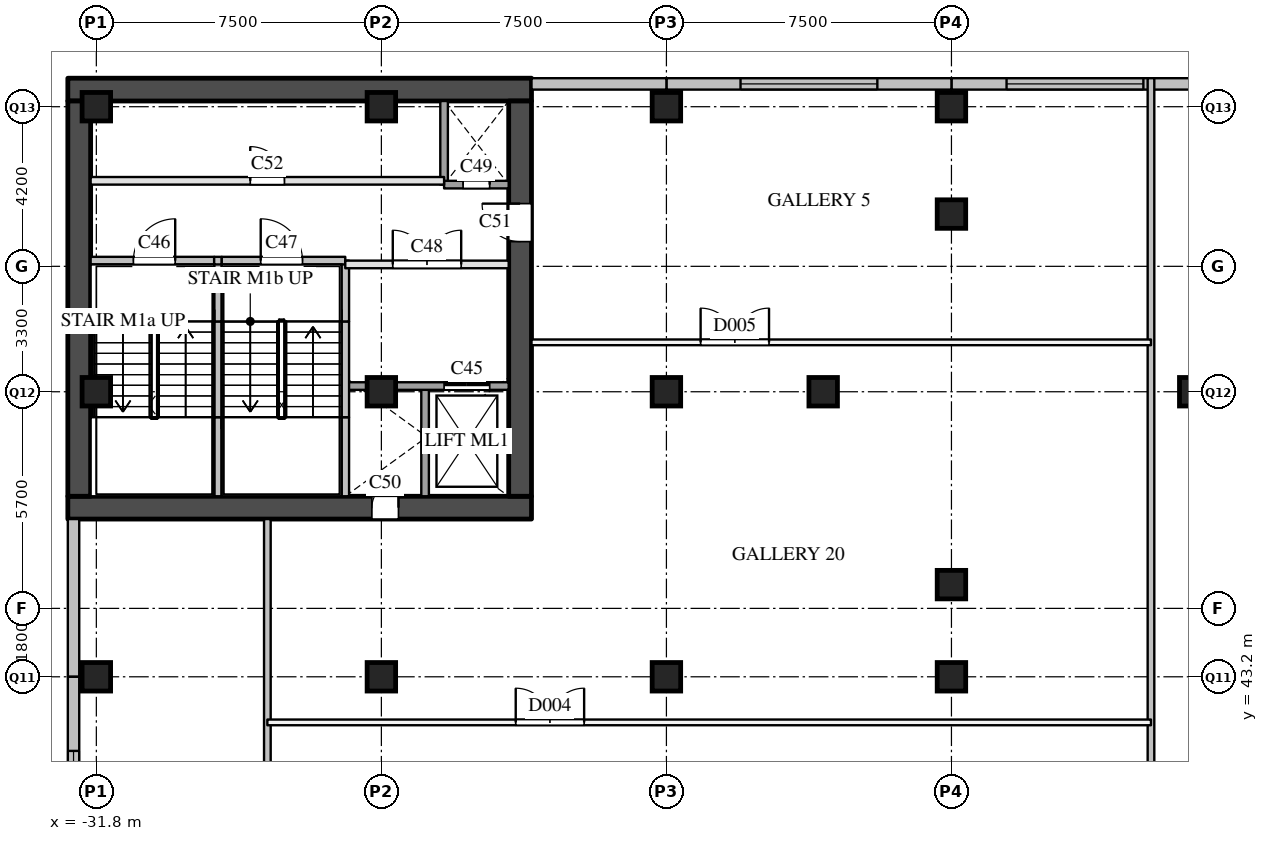
"""IFC4 building model, lengths in metres.
Left out: names, types, materials, properties, quantities, classifications, styles, units other than length and angle.
Written with IfcOpenShell. Run it as: python <this file> out.ifc"""

import sys

from ifc_helpers import new_model, si_unit, direction, frame, frame_2d, origin, origin_2d, place, context, subcontext, project, spatial, rectangle, extrude, element, fill, save


model = new_model("IFC4")
c1 = context("Model", 3, precision=1e-05, world=origin(), true_north=direction((0.0, 1.0)))
c2 = subcontext(c1, "Body", "Model", "MODEL_VIEW")
j1 = project(units=[si_unit("LENGTHUNIT", "METRE"), si_unit("PLANEANGLEUNIT", "RADIAN")], contexts=[c1])
p1 = place(None, origin())
s1 = spatial("IfcSite", under=j1, at=p1, CompositionType="ELEMENT")
p2 = place(p1, origin())
s2 = spatial("IfcBuilding", under=s1, at=p2, CompositionType="ELEMENT")
p3 = place(p2, frame((0.0, 0.0, 14.0)))
s3 = spatial("IfcBuildingStorey", under=s2, at=p3, CompositionType="ELEMENT", Elevation=14.0)
for number, where, z_axis, x_axis in (
    (1, (-31.8, 43.2, 0.0), (0.0, 0.0, 1.0), (1.0, 0.0, 0.0)),
    (2, (-31.8, 50.7, 0.0), (0.0, 0.0, 1.0), (1.0, 0.0, 0.0)),
    (3, (-31.8, 58.2, 0.0), (0.0, 0.0, 1.0), (1.0, 0.0, 0.0)),
    (4, (-24.3, 43.2, 0.0), (0.0, 0.0, 1.0), (1.0, 0.0, 0.0)),
    (5, (-24.3, 50.7, 0.0), (0.0, 0.0, 1.0), (1.0, 0.0, 0.0)),
    (6, (-24.3, 58.2, 0.0), (0.0, 0.0, 1.0), (1.0, 0.0, 0.0)),
    (7, (-16.8, 43.2, 0.0), (0.0, 0.0, 1.0), (1.0, 0.0, 0.0)),
    (8, (-16.8, 50.7, 0.0), (0.0, 0.0, 1.0), (1.0, 0.0, 0.0)),
    (9, (-16.8, 58.2, 0.0), (0.0, 0.0, 1.0), (1.0, 0.0, 0.0)),
    (10, (-9.3, 43.2, 0.0), (0.0, 0.0, 1.0), (1.0, 0.0, 0.0)),
    (11, (-9.3, 58.2, 0.0), (0.0, 0.0, 1.0), (1.0, 0.0, 0.0)),
    (12, (-12.675, 50.7, 0.0), (0.0, 0.0, 1.0), (1.0, 0.0, 0.0)),
    (13, (-9.3, 45.625, 0.0), (0.0, 0.0, 1.0), (1.0, 0.0, 0.0)),
    (14, (-9.3, 55.375, 0.0), (0.0, 0.0, 1.0), (1.0, 0.0, 0.0)),
    (15, (-2.925, 50.7, 0.0), (0.0, 0.0, 1.0), (1.0, 0.0, 0.0)),
):
    element("IfcColumn", number, at=place(p3, frame(where, z_axis=z_axis, x_axis=x_axis)), inside=s3, PredefinedType="COLUMN", context=c2, shape_type="SweptSolid", body=[
        extrude(rectangle(XDim=0.75, YDim=0.75, at=origin_2d()), origin(), (0.0, 0.0, 1.0), 7.0),
    ])
p4 = place(p3, frame((-1.8, 58.8, 0.0), z_axis=(0.0, 0.0, 1.0), x_axis=(-1.0, 0.0, 0.0)))
e16 = element("IfcWall", 16, at=p4, inside=s3, PredefinedType="SOLIDWALL", context=c2, shape_type="SweptSolid", body=[
    extrude(rectangle(XDim=7.5, YDim=0.3, at=frame_2d((3.75, 0.0))), origin(), (0.0, 0.0, 1.0), 6.59),
])
p5 = place(p4, frame((2.45, 0.0, 0.9)))
e17 = element("IfcOpeningElement", 17, at=p5, cuts=e16, PredefinedType="OPENING", context=c2, shape_type="SweptSolid", body=[
    extrude(rectangle(XDim=3.6, YDim=3.0, at=frame_2d((1.8, 1.5))), frame((0.0, 0.16, 0.0), z_axis=(0.0, -1.0, 0.0), x_axis=(1.0, 0.0, 0.0)), (0.0, 0.0, 1.0), 0.32),
])
p6 = place(p3, frame((-9.3, 58.8, 0.0), z_axis=(0.0, 0.0, 1.0), x_axis=(-1.0, 0.0, 0.0)))
e18 = element("IfcWall", 18, at=p6, inside=s3, PredefinedType="SOLIDWALL", context=c2, shape_type="SweptSolid", body=[
    extrude(rectangle(XDim=7.5, YDim=0.3, at=frame_2d((3.75, 0.0))), origin(), (0.0, 0.0, 1.0), 6.59),
])
p7 = place(p6, frame((1.95, 0.0, 0.9)))
e19 = element("IfcOpeningElement", 19, at=p7, cuts=e18, PredefinedType="OPENING", context=c2, shape_type="SweptSolid", body=[
    extrude(rectangle(XDim=3.6, YDim=3.0, at=frame_2d((1.8, 1.5))), frame((0.0, 0.16, 0.0), z_axis=(0.0, -1.0, 0.0), x_axis=(1.0, 0.0, 0.0)), (0.0, 0.0, 1.0), 0.32),
])
p8 = place(p3, frame((-16.8, 58.8, 0.0), z_axis=(0.0, 0.0, 1.0), x_axis=(-1.0, 0.0, 0.0)))
e20 = element("IfcWall", 20, at=p8, inside=s3, PredefinedType="SOLIDWALL", context=c2, shape_type="SweptSolid", body=[
    extrude(rectangle(XDim=3.55, YDim=0.3, at=frame_2d((1.775, 0.0))), origin(), (0.0, 0.0, 1.0), 6.59),
])
p9 = place(p3, frame((-32.4, 47.35, 0.0), z_axis=(0.0, 0.0, 1.0), x_axis=(0.0, -1.0, 0.0)))
e21 = element("IfcWall", 21, at=p9, inside=s3, PredefinedType="SOLIDWALL", context=c2, shape_type="SweptSolid", body=[
    extrude(rectangle(XDim=4.15, YDim=0.3, at=frame_2d((2.075, 0.0))), origin(), (0.0, 0.0, 1.0), 6.59),
])
p10 = place(p3, frame((-32.4, 43.2, 0.0), z_axis=(0.0, 0.0, 1.0), x_axis=(0.0, -1.0, 0.0)))
e22 = element("IfcWall", 22, at=p10, inside=s3, PredefinedType="SOLIDWALL", context=c2, shape_type="SweptSolid", body=[
    extrude(rectangle(XDim=7.5, YDim=0.3, at=frame_2d((3.75, 0.0))), origin(), (0.0, 0.0, 1.0), 6.59),
])
p11 = place(p10, frame((1.95, 0.0, 0.9)))
e23 = element("IfcOpeningElement", 23, at=p11, cuts=e22, PredefinedType="OPENING", context=c2, shape_type="SweptSolid", body=[
    extrude(rectangle(XDim=3.6, YDim=3.0, at=frame_2d((1.8, 1.5))), frame((0.0, 0.16, 0.0), z_axis=(0.0, -1.0, 0.0), x_axis=(1.0, 0.0, 0.0)), (0.0, 0.0, 1.0), 0.32),
])
p12 = place(p3, frame((-32.55, 47.65, 0.0), z_axis=(0.0, 0.0, 1.0), x_axis=(1.0, 0.0, 0.0)))
e24 = element("IfcWall", 24, at=p12, inside=s3, PredefinedType="SHEAR", context=c2, shape_type="SweptSolid", body=[
    extrude(rectangle(XDim=12.2, YDim=0.6, at=frame_2d((6.1, 0.0))), origin(), (0.0, 0.0, 1.0), 6.59),
])
p13 = place(p12, frame((8.0, 0.0, 0.0)))
e25 = element("IfcOpeningElement", 25, at=p13, cuts=e24, PredefinedType="OPENING", context=c2, shape_type="SweptSolid", body=[
    extrude(rectangle(XDim=0.7, YDim=2.1, at=frame_2d((0.35, 1.05))), frame((0.0, 0.31, 0.0), z_axis=(0.0, -1.0, 0.0), x_axis=(1.0, 0.0, 0.0)), (0.0, 0.0, 1.0), 0.62),
])
p14 = place(p3, frame((-32.55, 58.65, 0.0), z_axis=(0.0, 0.0, 1.0), x_axis=(1.0, 0.0, 0.0)))
e26 = element("IfcWall", 26, at=p14, inside=s3, PredefinedType="SHEAR", context=c2, shape_type="SweptSolid", body=[
    extrude(rectangle(XDim=12.2, YDim=0.6, at=frame_2d((6.1, 0.0))), origin(), (0.0, 0.0, 1.0), 6.59),
])
p15 = place(p3, frame((-32.25, 47.95, 0.0), z_axis=(0.0, 0.0, 1.0), x_axis=(0.0, 1.0, 0.0)))
e27 = element("IfcWall", 27, at=p15, inside=s3, PredefinedType="SHEAR", context=c2, shape_type="SweptSolid", body=[
    extrude(rectangle(XDim=10.4, YDim=0.6, at=frame_2d((5.2, 0.0))), origin(), (0.0, 0.0, 1.0), 6.59),
])
p16 = place(p3, frame((-20.65, 47.95, 0.0), z_axis=(0.0, 0.0, 1.0), x_axis=(0.0, 1.0, 0.0)))
e28 = element("IfcWall", 28, at=p16, inside=s3, PredefinedType="SHEAR", context=c2, shape_type="SweptSolid", body=[
    extrude(rectangle(XDim=10.4, YDim=0.6, at=frame_2d((5.2, 0.0))), origin(), (0.0, 0.0, 1.0), 6.59),
])
p17 = place(p16, frame((6.7, 0.0, 0.0)))
e29 = element("IfcOpeningElement", 29, at=p17, cuts=e28, PredefinedType="OPENING", context=c2, shape_type="SweptSolid", body=[
    extrude(rectangle(XDim=1.0, YDim=2.1, at=frame_2d((0.5, 1.05))), frame((0.0, 0.31, 0.0), z_axis=(0.0, -1.0, 0.0), x_axis=(1.0, 0.0, 0.0)), (0.0, 0.0, 1.0), 0.62),
])
p18 = place(p3, frame((-28.6, 47.95, 0.0), z_axis=(0.0, 0.0, 1.0), x_axis=(0.0, 1.0, 0.0)))
e30 = element("IfcWall", 30, at=p18, inside=s3, PredefinedType="SOLIDWALL", context=c2, shape_type="SweptSolid", body=[
    extrude(rectangle(XDim=2.08, YDim=0.2, at=frame_2d((1.04, 0.0))), origin(), (0.0, 0.0, 1.0), 6.59),
])
p19 = place(p3, frame((-28.6, 50.03, 0.0), z_axis=(0.0, 0.0, 1.0), x_axis=(0.0, 1.0, 0.0)))
e31 = element("IfcWall", 31, at=p19, inside=s3, PredefinedType="SOLIDWALL", context=c2, shape_type="SweptSolid", body=[
    extrude(rectangle(XDim=2.52, YDim=0.2, at=frame_2d((1.26, 0.0))), origin(), (0.0, 0.0, 1.0), 6.59),
])
p20 = place(p3, frame((-28.6, 52.55, 0.0), z_axis=(0.0, 0.0, 1.0), x_axis=(0.0, 1.0, 0.0)))
e32 = element("IfcWall", 32, at=p20, inside=s3, PredefinedType="SOLIDWALL", context=c2, shape_type="SweptSolid", body=[
    extrude(rectangle(XDim=1.6, YDim=0.2, at=frame_2d((0.8, 0.0))), origin(), (0.0, 0.0, 1.0), 6.59),
])
p21 = place(p3, frame((-25.25, 47.95, 0.0), z_axis=(0.0, 0.0, 1.0), x_axis=(0.0, 1.0, 0.0)))
e33 = element("IfcWall", 33, at=p21, inside=s3, PredefinedType="SOLIDWALL", context=c2, shape_type="SweptSolid", body=[
    extrude(rectangle(XDim=2.08, YDim=0.2, at=frame_2d((1.04, 0.0))), origin(), (0.0, 0.0, 1.0), 6.59),
])
p22 = place(p3, frame((-25.25, 50.03, 0.0), z_axis=(0.0, 0.0, 1.0), x_axis=(0.0, 1.0, 0.0)))
e34 = element("IfcWall", 34, at=p22, inside=s3, PredefinedType="SOLIDWALL", context=c2, shape_type="SweptSolid", body=[
    extrude(rectangle(XDim=2.52, YDim=0.2, at=frame_2d((1.26, 0.0))), origin(), (0.0, 0.0, 1.0), 6.59),
])
p23 = place(p3, frame((-25.25, 52.55, 0.0), z_axis=(0.0, 0.0, 1.0), x_axis=(0.0, 1.0, 0.0)))
e35 = element("IfcWall", 35, at=p23, inside=s3, PredefinedType="SOLIDWALL", context=c2, shape_type="SweptSolid", body=[
    extrude(rectangle(XDim=1.6, YDim=0.2, at=frame_2d((0.8, 0.0))), origin(), (0.0, 0.0, 1.0), 6.59),
])
p24 = place(p3, frame((-23.15, 47.95, 0.0), z_axis=(0.0, 0.0, 1.0), x_axis=(0.0, 1.0, 0.0)))
e36 = element("IfcWall", 36, at=p24, inside=s3, PredefinedType="SOLIDWALL", context=c2, shape_type="SweptSolid", body=[
    extrude(rectangle(XDim=2.9, YDim=0.2, at=frame_2d((1.45, 0.0))), origin(), (0.0, 0.0, 1.0), 6.59),
])
p25 = place(p3, frame((-22.65, 56.15, 0.0), z_axis=(0.0, 0.0, 1.0), x_axis=(0.0, 1.0, 0.0)))
e37 = element("IfcWall", 37, at=p25, inside=s3, PredefinedType="SOLIDWALL", context=c2, shape_type="SweptSolid", body=[
    extrude(rectangle(XDim=2.2, YDim=0.2, at=frame_2d((1.1, 0.0))), origin(), (0.0, 0.0, 1.0), 6.59),
])
p26 = place(p3, frame((-25.25, 50.85, 0.0), z_axis=(0.0, 0.0, 1.0), x_axis=(1.0, 0.0, 0.0)))
e38 = element("IfcWall", 38, at=p26, inside=s3, PredefinedType="SOLIDWALL", context=c2, shape_type="SweptSolid", body=[
    extrude(rectangle(XDim=4.3, YDim=0.2, at=frame_2d((2.15, 0.0))), origin(), (0.0, 0.0, 1.0), 6.59),
])
p27 = place(p26, frame((2.6, 0.0, 0.0)))
e39 = element("IfcOpeningElement", 39, at=p27, cuts=e38, PredefinedType="OPENING", context=c2, shape_type="SweptSolid", body=[
    extrude(rectangle(XDim=1.2, YDim=2.1, at=frame_2d((0.6, 1.05))), frame((0.0, 0.11, 0.0), z_axis=(0.0, -1.0, 0.0), x_axis=(1.0, 0.0, 0.0)), (0.0, 0.0, 1.0), 0.22),
])
p28 = place(p3, frame((-25.25, 54.05, 0.0), z_axis=(0.0, 0.0, 1.0), x_axis=(1.0, 0.0, 0.0)))
e40 = element("IfcWall", 40, at=p28, inside=s3, PredefinedType="PARTITIONING", context=c2, shape_type="SweptSolid", body=[
    extrude(rectangle(XDim=4.3, YDim=0.2, at=frame_2d((2.15, 0.0))), origin(), (0.0, 0.0, 1.0), 6.59),
])
p29 = place(p28, frame((1.25, 0.0, 0.0)))
e41 = element("IfcOpeningElement", 41, at=p29, cuts=e40, PredefinedType="OPENING", context=c2, shape_type="SweptSolid", body=[
    extrude(rectangle(XDim=1.8, YDim=2.1, at=frame_2d((0.9, 1.05))), frame((0.0, 0.11, 0.0), z_axis=(0.0, -1.0, 0.0), x_axis=(1.0, 0.0, 0.0)), (0.0, 0.0, 1.0), 0.22),
])
p30 = place(p3, frame((-31.95, 54.15, 0.0), z_axis=(0.0, 0.0, 1.0), x_axis=(1.0, 0.0, 0.0)))
e42 = element("IfcWall", 42, at=p30, inside=s3, PredefinedType="SOLIDWALL", context=c2, shape_type="SweptSolid", body=[
    extrude(rectangle(XDim=3.25, YDim=0.2, at=frame_2d((1.625, 0.0))), origin(), (0.0, 0.0, 1.0), 6.59),
])
p31 = place(p30, frame((1.125, 0.0, 0.0)))
e43 = element("IfcOpeningElement", 43, at=p31, cuts=e42, PredefinedType="OPENING", context=c2, shape_type="SweptSolid", body=[
    extrude(rectangle(XDim=1.1, YDim=2.1, at=frame_2d((0.55, 1.05))), frame((0.0, 0.11, 0.0), z_axis=(0.0, -1.0, 0.0), x_axis=(1.0, 0.0, 0.0)), (0.0, 0.0, 1.0), 0.22),
])
p32 = place(p3, frame((-28.7, 54.15, 0.0), z_axis=(0.0, 0.0, 1.0), x_axis=(1.0, 0.0, 0.0)))
e44 = element("IfcWall", 44, at=p32, inside=s3, PredefinedType="SOLIDWALL", context=c2, shape_type="SweptSolid", body=[
    extrude(rectangle(XDim=0.2, YDim=0.2, at=frame_2d((0.1, 0.0))), origin(), (0.0, 0.0, 1.0), 6.59),
])
p33 = place(p3, frame((-28.5, 54.15, 0.0), z_axis=(0.0, 0.0, 1.0), x_axis=(1.0, 0.0, 0.0)))
e45 = element("IfcWall", 45, at=p33, inside=s3, PredefinedType="SOLIDWALL", context=c2, shape_type="SweptSolid", body=[
    extrude(rectangle(XDim=3.25, YDim=0.2, at=frame_2d((1.625, 0.0))), origin(), (0.0, 0.0, 1.0), 6.59),
])
p34 = place(p33, frame((1.025, 0.0, 0.0)))
e46 = element("IfcOpeningElement", 46, at=p34, cuts=e45, PredefinedType="OPENING", context=c2, shape_type="SweptSolid", body=[
    extrude(rectangle(XDim=1.1, YDim=2.1, at=frame_2d((0.55, 1.05))), frame((0.0, 0.11, 0.0), z_axis=(0.0, -1.0, 0.0), x_axis=(1.0, 0.0, 0.0)), (0.0, 0.0, 1.0), 0.22),
])
p35 = place(p3, frame((-31.95, 56.25, 0.0), z_axis=(0.0, 0.0, 1.0), x_axis=(1.0, 0.0, 0.0)))
e47 = element("IfcWall", 47, at=p35, inside=s3, PredefinedType="PARTITIONING", context=c2, shape_type="SweptSolid", body=[
    extrude(rectangle(XDim=9.3, YDim=0.2, at=frame_2d((4.65, 0.0))), origin(), (0.0, 0.0, 1.0), 6.59),
])
p36 = place(p35, frame((4.2, 0.0, 0.0)))
e48 = element("IfcOpeningElement", 48, at=p36, cuts=e47, PredefinedType="OPENING", context=c2, shape_type="SweptSolid", body=[
    extrude(rectangle(XDim=0.9, YDim=2.1, at=frame_2d((0.45, 1.05))), frame((0.0, 0.11, 0.0), z_axis=(0.0, -1.0, 0.0), x_axis=(1.0, 0.0, 0.0)), (0.0, 0.0, 1.0), 0.22),
])
p37 = place(p3, frame((-22.65, 56.15, 0.0), z_axis=(0.0, 0.0, 1.0), x_axis=(1.0, 0.0, 0.0)))
e49 = element("IfcWall", 49, at=p37, inside=s3, PredefinedType="SOLIDWALL", context=c2, shape_type="SweptSolid", body=[
    extrude(rectangle(XDim=1.7, YDim=0.2, at=frame_2d((0.85, 0.0))), origin(), (0.0, 0.0, 1.0), 6.59),
])
p38 = place(p37, frame((0.5, 0.0, 0.0)))
e50 = element("IfcOpeningElement", 50, at=p38, cuts=e49, PredefinedType="OPENING", context=c2, shape_type="SweptSolid", body=[
    extrude(rectangle(XDim=0.7, YDim=2.1, at=frame_2d((0.35, 1.05))), frame((0.0, 0.11, 0.0), z_axis=(0.0, -1.0, 0.0), x_axis=(1.0, 0.0, 0.0)), (0.0, 0.0, 1.0), 0.22),
])
p39 = place(p3, frame((-27.3, 30.0, 0.0), z_axis=(0.0, 0.0, 1.0), x_axis=(0.0, 1.0, 0.0)))
e51 = element("IfcWall", 51, at=p39, inside=s3, PredefinedType="PARTITIONING", context=c2, shape_type="SweptSolid", body=[
    extrude(rectangle(XDim=17.35, YDim=0.175, at=frame_2d((8.675, 0.0))), origin(), (0.0, 0.0, 1.0), 5.79),
])
p40 = place(p3, frame((-4.05, -4.05, 0.0), z_axis=(0.0, 0.0, 1.0), x_axis=(0.0, 1.0, 0.0)))
e52 = element("IfcWall", 52, at=p40, inside=s3, PredefinedType="PARTITIONING", context=c2, shape_type="SweptSolid", body=[
    extrude(rectangle(XDim=63.0, YDim=0.175, at=frame_2d((31.5, 0.0))), origin(), (0.0, 0.0, 1.0), 5.79),
])
p41 = place(p40, frame((7.125, 0.0, 0.0)))
e53 = element("IfcOpeningElement", 53, at=p41, cuts=e52, PredefinedType="OPENING", context=c2, shape_type="SweptSolid", body=[
    extrude(rectangle(XDim=1.8, YDim=2.1, at=frame_2d((0.9, 1.05))), frame((0.0, 0.097, 0.0), z_axis=(0.0, -1.0, 0.0), x_axis=(1.0, 0.0, 0.0)), (0.0, 0.0, 1.0), 0.195),
])
p42 = place(p3, frame((-27.3, 42.0, 0.0), z_axis=(0.0, 0.0, 1.0), x_axis=(1.0, 0.0, 0.0)))
e54 = element("IfcWall", 54, at=p42, inside=s3, PredefinedType="PARTITIONING", context=c2, shape_type="SweptSolid", body=[
    extrude(rectangle(XDim=23.25, YDim=0.15, at=frame_2d((11.625, 0.0))), origin(), (0.0, 0.0, 1.0), 5.79),
])
p43 = place(p42, frame((6.535, 0.0, 0.0)))
e55 = element("IfcOpeningElement", 55, at=p43, cuts=e54, PredefinedType="OPENING", context=c2, shape_type="SweptSolid", body=[
    extrude(rectangle(XDim=1.8, YDim=2.1, at=frame_2d((0.9, 1.05))), frame((0.0, 0.085, 0.0), z_axis=(0.0, -1.0, 0.0), x_axis=(1.0, 0.0, 0.0)), (0.0, 0.0, 1.0), 0.17),
])
p44 = place(p3, frame((-20.35, 52.0, 0.0), z_axis=(0.0, 0.0, 1.0), x_axis=(1.0, 0.0, 0.0)))
e56 = element("IfcWall", 56, at=p44, inside=s3, PredefinedType="PARTITIONING", context=c2, shape_type="SweptSolid", body=[
    extrude(rectangle(XDim=16.3, YDim=0.15, at=frame_2d((8.15, 0.0))), origin(), (0.0, 0.0, 1.0), 5.79),
])
p45 = place(p44, frame((4.45, 0.0, 0.0)))
e57 = element("IfcOpeningElement", 57, at=p45, cuts=e56, PredefinedType="OPENING", context=c2, shape_type="SweptSolid", body=[
    extrude(rectangle(XDim=1.8, YDim=2.1, at=frame_2d((0.9, 1.05))), frame((0.0, 0.085, 0.0), z_axis=(0.0, -1.0, 0.0), x_axis=(1.0, 0.0, 0.0)), (0.0, 0.0, 1.0), 0.17),
])
p46 = place(p5, origin())
e58 = element("IfcWindow", 58, at=p46, inside=s3, PartitioningType="SINGLE_PANEL", PredefinedType="WINDOW", context=c2, shape_type="SweptSolid", body=[
    extrude(rectangle(XDim=3.6, YDim=3.0, at=frame_2d((1.8, 1.5))), frame((0.0, 0.03, 0.0), z_axis=(0.0, -1.0, 0.0), x_axis=(1.0, 0.0, 0.0)), (0.0, 0.0, 1.0), 0.06),
])
fill(e17, e58)
p47 = place(p7, origin())
e59 = element("IfcWindow", 59, at=p47, inside=s3, PartitioningType="SINGLE_PANEL", PredefinedType="WINDOW", context=c2, shape_type="SweptSolid", body=[
    extrude(rectangle(XDim=3.6, YDim=3.0, at=frame_2d((1.8, 1.5))), frame((0.0, 0.03, 0.0), z_axis=(0.0, -1.0, 0.0), x_axis=(1.0, 0.0, 0.0)), (0.0, 0.0, 1.0), 0.06),
])
fill(e19, e59)
p48 = place(p11, origin())
e60 = element("IfcWindow", 60, at=p48, inside=s3, PartitioningType="SINGLE_PANEL", PredefinedType="WINDOW", context=c2, shape_type="SweptSolid", body=[
    extrude(rectangle(XDim=3.6, YDim=3.0, at=frame_2d((1.8, 1.5))), frame((0.0, 0.03, 0.0), z_axis=(0.0, -1.0, 0.0), x_axis=(1.0, 0.0, 0.0)), (0.0, 0.0, 1.0), 0.06),
])
fill(e23, e60)
p49 = place(p27, origin())
e61 = element("IfcDoor", 61, at=p49, inside=s3, OperationType="SLIDING_TO_LEFT", PredefinedType="DOOR", context=c2, shape_type="SweptSolid", body=[
    extrude(rectangle(XDim=1.2, YDim=2.1, at=frame_2d((0.6, 1.05))), frame((0.0, 0.025, 0.0), z_axis=(0.0, -1.0, 0.0), x_axis=(1.0, 0.0, 0.0)), (0.0, 0.0, 1.0), 0.05),
])
fill(e39, e61)
p50 = place(p31, origin())
e62 = element("IfcDoor", 62, at=p50, inside=s3, OperationType="SINGLE_SWING_RIGHT", PredefinedType="DOOR", context=c2, shape_type="SweptSolid", body=[
    extrude(rectangle(XDim=1.1, YDim=2.1, at=frame_2d((0.55, 1.05))), frame((0.0, 0.025, 0.0), z_axis=(0.0, -1.0, 0.0), x_axis=(1.0, 0.0, 0.0)), (0.0, 0.0, 1.0), 0.05),
])
fill(e43, e62)
p51 = place(p34, origin())
e63 = element("IfcDoor", 63, at=p51, inside=s3, OperationType="SINGLE_SWING_LEFT", PredefinedType="DOOR", context=c2, shape_type="SweptSolid", body=[
    extrude(rectangle(XDim=1.1, YDim=2.1, at=frame_2d((0.55, 1.05))), frame((0.0, 0.025, 0.0), z_axis=(0.0, -1.0, 0.0), x_axis=(1.0, 0.0, 0.0)), (0.0, 0.0, 1.0), 0.05),
])
fill(e46, e63)
p52 = place(p29, origin())
e64 = element("IfcDoor", 64, at=p52, inside=s3, OperationType="DOUBLE_DOOR_SINGLE_SWING", PredefinedType="DOOR", context=c2, shape_type="SweptSolid", body=[
    extrude(rectangle(XDim=1.8, YDim=2.1, at=frame_2d((0.9, 1.05))), frame((0.0, 0.025, 0.0), z_axis=(0.0, -1.0, 0.0), x_axis=(1.0, 0.0, 0.0)), (0.0, 0.0, 1.0), 0.05),
])
fill(e41, e64)
p53 = place(p38, origin())
e65 = element("IfcDoor", 65, at=p53, inside=s3, OperationType="SINGLE_SWING_RIGHT", PredefinedType="DOOR", context=c2, shape_type="SweptSolid", body=[
    extrude(rectangle(XDim=0.7, YDim=2.1, at=frame_2d((0.35, 1.05))), frame((0.0, 0.025, 0.0), z_axis=(0.0, -1.0, 0.0), x_axis=(1.0, 0.0, 0.0)), (0.0, 0.0, 1.0), 0.05),
])
fill(e50, e65)
p54 = place(p13, origin())
e66 = element("IfcDoor", 66, at=p54, inside=s3, OperationType="SINGLE_SWING_RIGHT", PredefinedType="DOOR", context=c2, shape_type="SweptSolid", body=[
    extrude(rectangle(XDim=0.7, YDim=2.1, at=frame_2d((0.35, 1.05))), frame((0.0, 0.025, 0.0), z_axis=(0.0, -1.0, 0.0), x_axis=(1.0, 0.0, 0.0)), (0.0, 0.0, 1.0), 0.05),
])
fill(e25, e66)
p55 = place(p17, origin())
e67 = element("IfcDoor", 67, at=p55, inside=s3, OperationType="SINGLE_SWING_RIGHT", PredefinedType="DOOR", context=c2, shape_type="SweptSolid", body=[
    extrude(rectangle(XDim=1.0, YDim=2.1, at=frame_2d((0.5, 1.05))), frame((0.0, 0.025, 0.0), z_axis=(0.0, -1.0, 0.0), x_axis=(1.0, 0.0, 0.0)), (0.0, 0.0, 1.0), 0.05),
])
fill(e29, e67)
p56 = place(p36, origin())
e68 = element("IfcDoor", 68, at=p56, inside=s3, OperationType="SINGLE_SWING_LEFT", PredefinedType="DOOR", context=c2, shape_type="SweptSolid", body=[
    extrude(rectangle(XDim=0.9, YDim=2.1, at=frame_2d((0.45, 1.05))), frame((0.0, 0.025, 0.0), z_axis=(0.0, -1.0, 0.0), x_axis=(1.0, 0.0, 0.0)), (0.0, 0.0, 1.0), 0.05),
])
fill(e48, e68)
p57 = place(p43, origin())
e69 = element("IfcDoor", 69, at=p57, inside=s3, OperationType="DOUBLE_DOOR_SINGLE_SWING", PredefinedType="DOOR", context=c2, shape_type="SweptSolid", body=[
    extrude(rectangle(XDim=1.8, YDim=2.1, at=frame_2d((0.9, 1.05))), frame((0.0, 0.025, 0.0), z_axis=(0.0, -1.0, 0.0), x_axis=(1.0, 0.0, 0.0)), (0.0, 0.0, 1.0), 0.05),
])
fill(e55, e69)
p58 = place(p45, origin())
e70 = element("IfcDoor", 70, at=p58, inside=s3, OperationType="DOUBLE_DOOR_SINGLE_SWING", PredefinedType="DOOR", context=c2, shape_type="SweptSolid", body=[
    extrude(rectangle(XDim=1.8, YDim=2.1, at=frame_2d((0.9, 1.05))), frame((0.0, 0.025, 0.0), z_axis=(0.0, -1.0, 0.0), x_axis=(1.0, 0.0, 0.0)), (0.0, 0.0, 1.0), 0.05),
])
fill(e57, e70)
save(model, sys.argv[1])
